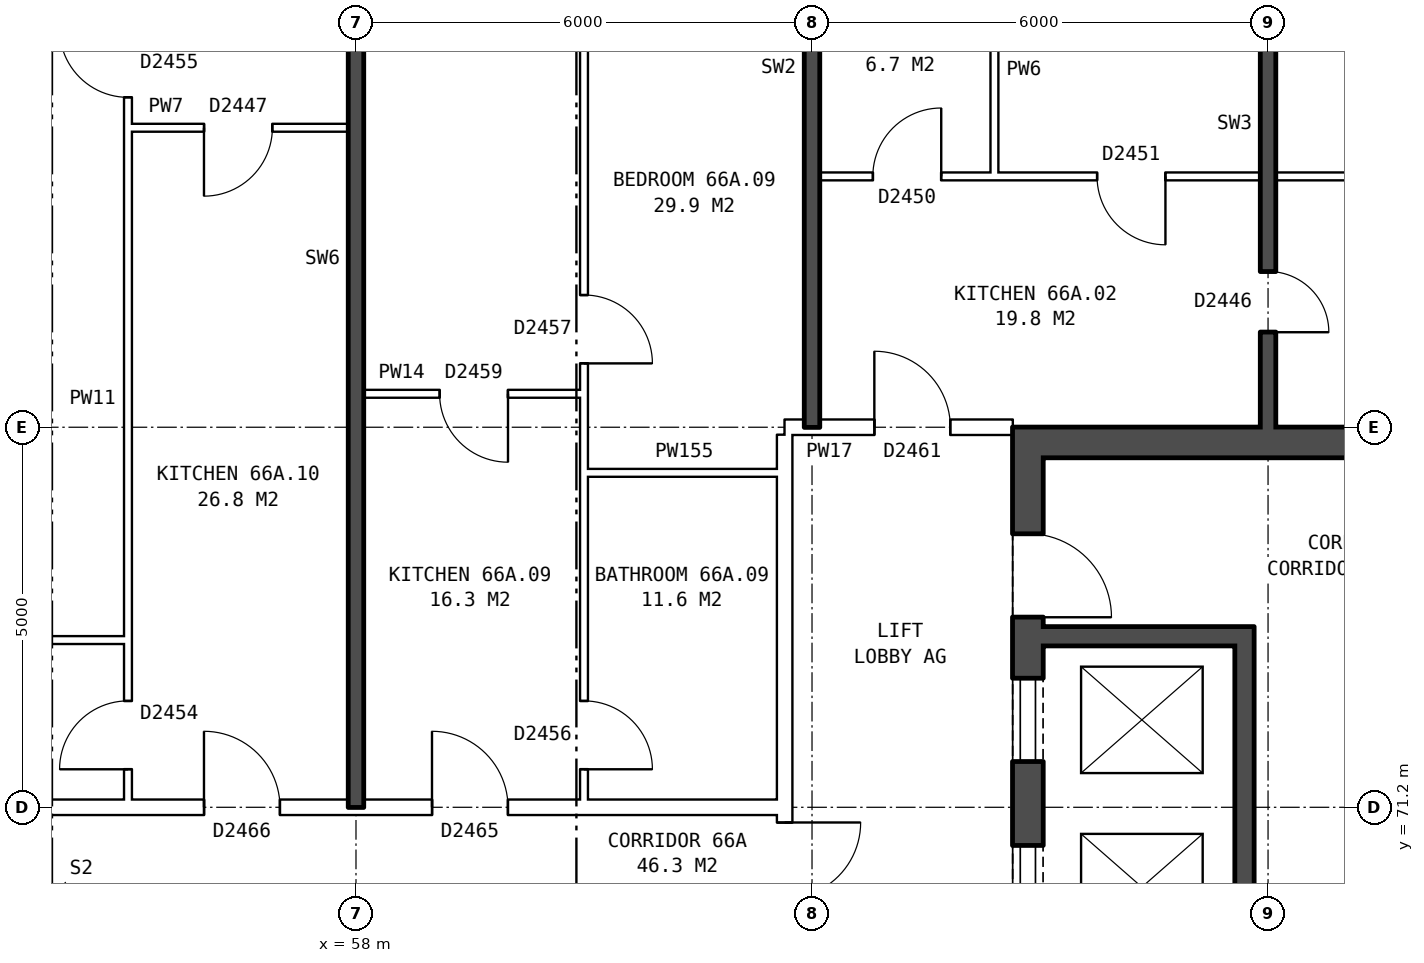
"""IFC4 building model, lengths in metres.
Left out: names, types, materials, properties, quantities, classifications, styles, units other than length and angle.
Written with IfcOpenShell. Run it as: python <this file> out.ifc"""

import sys

from ifc_helpers import new_model, si_unit, direction, frame, frame_2d, origin, place, context, subcontext, project, spatial, rectangle, extrude, element, fill, save


model = new_model("IFC4")
c1 = context("Model", 3, precision=1e-05, world=origin(), true_north=direction((0.0, 1.0)))
c2 = subcontext(c1, "Body", "Model", "MODEL_VIEW")
j1 = project(units=[si_unit("LENGTHUNIT", "METRE"), si_unit("PLANEANGLEUNIT", "RADIAN")], contexts=[c1])
p1 = place(None, origin())
s1 = spatial("IfcSite", under=j1, at=p1, CompositionType="ELEMENT")
p2 = place(p1, origin())
s2 = spatial("IfcBuilding", under=s1, at=p2, CompositionType="ELEMENT")
p3 = place(p2, frame((0.0, 0.0, 233.8)))
s3 = spatial("IfcBuildingStorey", under=s2, at=p3, CompositionType="ELEMENT", Elevation=233.8)
p4 = place(p3, frame((66.84, 63.8, 0.0), z_axis=(0.0, 0.0, 1.0), x_axis=(0.0, 1.0, 0.0)))
e1 = element("IfcWall", 1, at=p4, inside=s3, PredefinedType="SHEAR", context=c2, shape_type="SweptSolid", body=[
    extrude(rectangle(XDim=12.4, YDim=0.4, at=frame_2d((6.2, 0.0))), origin(), (0.0, 0.0, 1.0), 2.85),
])
p5 = place(p4, frame((1.325, 0.0, 0.0)))
e2 = element("IfcOpeningElement", 2, at=p5, cuts=e1, PredefinedType="OPENING", context=c2, shape_type="SweptSolid", body=[
    extrude(rectangle(XDim=1.1, YDim=2.1, at=frame_2d((0.55, 1.05))), frame((0.0, 0.21, 0.0), z_axis=(0.0, -1.0, 0.0), x_axis=(1.0, 0.0, 0.0)), (0.0, 0.0, 1.0), 0.42),
])
p6 = place(p4, frame((3.6, 0.0, 0.0)))
e3 = element("IfcOpeningElement", 3, at=p6, cuts=e1, PredefinedType="OPENING", context=c2, shape_type="SweptSolid", body=[
    extrude(rectangle(XDim=1.1, YDim=2.1, at=frame_2d((0.55, 1.05))), frame((0.0, 0.21, 0.0), z_axis=(0.0, -1.0, 0.0), x_axis=(1.0, 0.0, 0.0)), (0.0, 0.0, 1.0), 0.42),
])
p7 = place(p4, frame((5.8, 0.0, 0.0)))
e4 = element("IfcOpeningElement", 4, at=p7, cuts=e1, PredefinedType="OPENING", context=c2, shape_type="SweptSolid", body=[
    extrude(rectangle(XDim=1.1, YDim=2.1, at=frame_2d((0.55, 1.05))), frame((0.0, 0.21, 0.0), z_axis=(0.0, -1.0, 0.0), x_axis=(1.0, 0.0, 0.0)), (0.0, 0.0, 1.0), 0.42),
])
p8 = place(p4, frame((8.0, 0.0, 0.0)))
e5 = element("IfcOpeningElement", 5, at=p8, cuts=e1, PredefinedType="OPENING", context=c2, shape_type="SweptSolid", body=[
    extrude(rectangle(XDim=1.1, YDim=2.1, at=frame_2d((0.55, 1.05))), frame((0.0, 0.21, 0.0), z_axis=(0.0, -1.0, 0.0), x_axis=(1.0, 0.0, 0.0)), (0.0, 0.0, 1.0), 0.42),
])
p9 = place(p4, frame((9.9, 0.0, 0.0)))
e6 = element("IfcOpeningElement", 6, at=p9, cuts=e1, PredefinedType="OPENING", context=c2, shape_type="SweptSolid", body=[
    extrude(rectangle(XDim=1.1, YDim=2.1, at=frame_2d((0.55, 1.05))), frame((0.0, 0.21, 0.0), z_axis=(0.0, -1.0, 0.0), x_axis=(1.0, 0.0, 0.0)), (0.0, 0.0, 1.0), 0.42),
])
p10 = place(p3, frame((67.04, 76.0, 0.0), z_axis=(0.0, 0.0, 1.0), x_axis=(1.0, 0.0, 0.0)))
e7 = element("IfcWall", 7, at=p10, inside=s3, PredefinedType="SHEAR", context=c2, shape_type="SweptSolid", body=[
    extrude(rectangle(XDim=8.2, YDim=0.4, at=frame_2d((4.1, 0.0))), origin(), (0.0, 0.0, 1.0), 2.85),
])
p11 = place(p3, frame((67.04, 73.45, 0.0), z_axis=(0.0, 0.0, 1.0), x_axis=(1.0, 0.0, 0.0)))
e8 = element("IfcWall", 8, at=p11, inside=s3, PredefinedType="SHEAR", context=c2, shape_type="SweptSolid", body=[
    extrude(rectangle(XDim=2.525, YDim=0.25, at=frame_2d((1.262, 0.0))), origin(), (0.0, 0.0, 1.0), 2.85),
])
p12 = place(p3, frame((69.69, 66.975, 0.0), z_axis=(0.0, 0.0, 1.0), x_axis=(0.0, 1.0, 0.0)))
e9 = element("IfcWall", 9, at=p12, inside=s3, PredefinedType="SHEAR", context=c2, shape_type="SweptSolid", body=[
    extrude(rectangle(XDim=6.6, YDim=0.25, at=frame_2d((3.3, 0.0))), origin(), (0.0, 0.0, 1.0), 2.85),
])
p13 = place(p3, frame((63.64, 63.9, 0.0), z_axis=(0.0, 0.0, 1.0), x_axis=(0.0, 1.0, 0.0)))
e10 = element("IfcWall", 10, at=p13, inside=s3, PredefinedType="PARTITIONING", context=c2, shape_type="SweptSolid", body=[
    extrude(rectangle(XDim=12.2, YDim=0.2, at=frame_2d((6.1, 0.0))), origin(), (0.0, 0.0, 1.0), 2.85),
])
p14 = place(p13, frame((5.1, 0.0, 0.0)))
e11 = element("IfcOpeningElement", 11, at=p14, cuts=e10, PredefinedType="OPENING", context=c2, shape_type="SweptSolid", body=[
    extrude(rectangle(XDim=2.0, YDim=2.1, at=frame_2d((1.0, 1.05))), frame((0.0, 0.11, 0.0), z_axis=(0.0, -1.0, 0.0), x_axis=(1.0, 0.0, 0.0)), (0.0, 0.0, 1.0), 0.22),
])
p15 = place(p3, frame((44.36, 71.2, 0.0), z_axis=(0.0, 0.0, 1.0), x_axis=(1.0, 0.0, 0.0)))
e12 = element("IfcWall", 12, at=p15, inside=s3, PredefinedType="PARTITIONING", context=c2, shape_type="SweptSolid", body=[
    extrude(rectangle(XDim=19.28, YDim=0.2, at=frame_2d((9.64, 0.0))), origin(), (0.0, 0.0, 1.0), 2.85),
])
p16 = place(p15, frame((14.64, 0.0, 0.0)))
e13 = element("IfcOpeningElement", 13, at=p16, cuts=e12, PredefinedType="OPENING", context=c2, shape_type="SweptSolid", body=[
    extrude(rectangle(XDim=1.0, YDim=2.1, at=frame_2d((0.5, 1.05))), frame((0.0, 0.11, 0.0), z_axis=(0.0, -1.0, 0.0), x_axis=(1.0, 0.0, 0.0)), (0.0, 0.0, 1.0), 0.22),
])
p17 = place(p15, frame((11.64, 0.0, 0.0)))
e14 = element("IfcOpeningElement", 14, at=p17, cuts=e12, PredefinedType="OPENING", context=c2, shape_type="SweptSolid", body=[
    extrude(rectangle(XDim=1.0, YDim=2.1, at=frame_2d((0.5, 1.05))), frame((0.0, 0.11, 0.0), z_axis=(0.0, -1.0, 0.0), x_axis=(1.0, 0.0, 0.0)), (0.0, 0.0, 1.0), 0.22),
])
p18 = place(p15, frame((2.64, 0.0, 0.0)))
e15 = element("IfcOpeningElement", 15, at=p18, cuts=e12, PredefinedType="OPENING", context=c2, shape_type="SweptSolid", body=[
    extrude(rectangle(XDim=1.0, YDim=2.1, at=frame_2d((0.5, 1.05))), frame((0.0, 0.11, 0.0), z_axis=(0.0, -1.0, 0.0), x_axis=(1.0, 0.0, 0.0)), (0.0, 0.0, 1.0), 0.22),
])
p19 = place(p3, frame((52.1, 73.4, 0.0), z_axis=(0.0, 0.0, 1.0), x_axis=(1.0, 0.0, 0.0)))
e16 = element("IfcWall", 16, at=p19, inside=s3, PredefinedType="PARTITIONING", context=c2, shape_type="SweptSolid", body=[
    extrude(rectangle(XDim=2.9, YDim=0.1, at=frame_2d((1.45, 0.0))), origin(), (0.0, 0.0, 1.0), 2.85),
])
p20 = place(p3, frame((61.0, 75.6, 0.0), z_axis=(0.0, 0.0, 1.0), x_axis=(1.0, 0.0, 0.0)))
e17 = element("IfcWall", 17, at=p20, inside=s3, PredefinedType="PARTITIONING", context=c2, shape_type="SweptSolid", body=[
    extrude(rectangle(XDim=2.64, YDim=0.1, at=frame_2d((1.32, 0.0))), origin(), (0.0, 0.0, 1.0), 2.85),
])
p21 = place(p3, frame((63.64, 76.2, 0.0), z_axis=(0.0, 0.0, 1.0), x_axis=(1.0, 0.0, 0.0)))
e18 = element("IfcWall", 18, at=p21, inside=s3, PredefinedType="PARTITIONING", context=c2, shape_type="SweptSolid", body=[
    extrude(rectangle(XDim=3.0, YDim=0.2, at=frame_2d((1.5, 0.0))), origin(), (0.0, 0.0, 1.0), 2.85),
])
p22 = place(p21, frame((1.18, 0.0, 0.0)))
e19 = element("IfcOpeningElement", 19, at=p22, cuts=e18, PredefinedType="OPENING", context=c2, shape_type="SweptSolid", body=[
    extrude(rectangle(XDim=1.0, YDim=2.1, at=frame_2d((0.5, 1.05))), frame((0.0, 0.11, 0.0), z_axis=(0.0, -1.0, 0.0), x_axis=(1.0, 0.0, 0.0)), (0.0, 0.0, 1.0), 0.22),
])
p23 = place(p3, frame((58.1, 76.64, 0.0), z_axis=(0.0, 0.0, 1.0), x_axis=(1.0, 0.0, 0.0)))
e20 = element("IfcWall", 20, at=p23, inside=s3, PredefinedType="PARTITIONING", context=c2, shape_type="SweptSolid", body=[
    extrude(rectangle(XDim=2.9, YDim=0.1, at=frame_2d((1.45, 0.0))), origin(), (0.0, 0.0, 1.0), 2.85),
])
p24 = place(p23, frame((1.0, 0.0, 0.0)))
e21 = element("IfcOpeningElement", 21, at=p24, cuts=e20, PredefinedType="OPENING", context=c2, shape_type="SweptSolid", body=[
    extrude(rectangle(XDim=0.9, YDim=2.1, at=frame_2d((0.45, 1.05))), frame((0.0, 0.06, 0.0), z_axis=(0.0, -1.0, 0.0), x_axis=(1.0, 0.0, 0.0)), (0.0, 0.0, 1.0), 0.12),
])
p25 = place(p3, frame((64.1, 79.5, 0.0), z_axis=(0.0, 0.0, 1.0), x_axis=(1.0, 0.0, 0.0)))
e22 = element("IfcWall", 22, at=p25, inside=s3, PredefinedType="PARTITIONING", context=c2, shape_type="SweptSolid", body=[
    extrude(rectangle(XDim=11.8, YDim=0.1, at=frame_2d((5.9, 0.0))), origin(), (0.0, 0.0, 1.0), 2.85),
])
p26 = place(p25, frame((3.65, 0.0, 0.0)))
e23 = element("IfcOpeningElement", 23, at=p26, cuts=e22, PredefinedType="OPENING", context=c2, shape_type="SweptSolid", body=[
    extrude(rectangle(XDim=0.9, YDim=2.1, at=frame_2d((0.45, 1.05))), frame((0.0, 0.06, 0.0), z_axis=(0.0, -1.0, 0.0), x_axis=(1.0, 0.0, 0.0)), (0.0, 0.0, 1.0), 0.12),
])
p27 = place(p25, frame((0.7, 0.0, 0.0)))
e24 = element("IfcOpeningElement", 24, at=p27, cuts=e22, PredefinedType="OPENING", context=c2, shape_type="SweptSolid", body=[
    extrude(rectangle(XDim=0.9, YDim=2.1, at=frame_2d((0.45, 1.05))), frame((0.0, 0.06, 0.0), z_axis=(0.0, -1.0, 0.0), x_axis=(1.0, 0.0, 0.0)), (0.0, 0.0, 1.0), 0.12),
])
p28 = place(p3, frame((55.0, 80.14, 0.0), z_axis=(0.0, 0.0, 1.0), x_axis=(1.0, 0.0, 0.0)))
e25 = element("IfcWall", 25, at=p28, inside=s3, PredefinedType="PARTITIONING", context=c2, shape_type="SweptSolid", body=[
    extrude(rectangle(XDim=2.9, YDim=0.1, at=frame_2d((1.45, 0.0))), origin(), (0.0, 0.0, 1.0), 2.85),
])
p29 = place(p28, frame((1.0, 0.0, 0.0)))
e26 = element("IfcOpeningElement", 26, at=p29, cuts=e25, PredefinedType="OPENING", context=c2, shape_type="SweptSolid", body=[
    extrude(rectangle(XDim=0.9, YDim=2.1, at=frame_2d((0.45, 1.05))), frame((0.0, 0.06, 0.0), z_axis=(0.0, -1.0, 0.0), x_axis=(1.0, 0.0, 0.0)), (0.0, 0.0, 1.0), 0.12),
])
p30 = place(p3, frame((55.0, 71.3, 0.0), z_axis=(0.0, 0.0, 1.0), x_axis=(0.0, 1.0, 0.0)))
e27 = element("IfcWall", 27, at=p30, inside=s3, PredefinedType="PARTITIONING", context=c2, shape_type="SweptSolid", body=[
    extrude(rectangle(XDim=14.34, YDim=0.1, at=frame_2d((7.17, 0.0))), origin(), (0.0, 0.0, 1.0), 2.85),
])
p31 = place(p30, frame((9.24, 0.0, 0.0)))
e28 = element("IfcOpeningElement", 28, at=p31, cuts=e27, PredefinedType="OPENING", context=c2, shape_type="SweptSolid", body=[
    extrude(rectangle(XDim=0.9, YDim=2.1, at=frame_2d((0.45, 1.05))), frame((0.0, 0.06, 0.0), z_axis=(0.0, -1.0, 0.0), x_axis=(1.0, 0.0, 0.0)), (0.0, 0.0, 1.0), 0.12),
])
p32 = place(p30, frame((0.4, 0.0, 0.0)))
e29 = element("IfcOpeningElement", 29, at=p32, cuts=e27, PredefinedType="OPENING", context=c2, shape_type="SweptSolid", body=[
    extrude(rectangle(XDim=0.9, YDim=2.1, at=frame_2d((0.45, 1.05))), frame((0.0, 0.06, 0.0), z_axis=(0.0, -1.0, 0.0), x_axis=(1.0, 0.0, 0.0)), (0.0, 0.0, 1.0), 0.12),
])
p33 = place(p3, frame((58.0, 71.2, 0.0), z_axis=(0.0, 0.0, 1.0), x_axis=(0.0, 1.0, 0.0)))
e30 = element("IfcWall", 30, at=p33, inside=s3, PredefinedType="SOLIDWALL", context=c2, shape_type="SweptSolid", body=[
    extrude(rectangle(XDim=14.44, YDim=0.2, at=frame_2d((7.22, 0.0))), origin(), (0.0, 0.0, 1.0), 2.85),
])
p34 = place(p3, frame((61.0, 71.3, 0.0), z_axis=(0.0, 0.0, 1.0), x_axis=(0.0, 1.0, 0.0)))
e31 = element("IfcWall", 31, at=p34, inside=s3, PredefinedType="PARTITIONING", context=c2, shape_type="SweptSolid", body=[
    extrude(rectangle(XDim=14.34, YDim=0.1, at=frame_2d((7.17, 0.0))), origin(), (0.0, 0.0, 1.0), 2.85),
])
p35 = place(p34, frame((5.74, 0.0, 0.0)))
e32 = element("IfcOpeningElement", 32, at=p35, cuts=e31, PredefinedType="OPENING", context=c2, shape_type="SweptSolid", body=[
    extrude(rectangle(XDim=0.9, YDim=2.1, at=frame_2d((0.45, 1.05))), frame((0.0, 0.06, 0.0), z_axis=(0.0, -1.0, 0.0), x_axis=(1.0, 0.0, 0.0)), (0.0, 0.0, 1.0), 0.12),
])
p36 = place(p34, frame((0.4, 0.0, 0.0)))
e33 = element("IfcOpeningElement", 33, at=p36, cuts=e31, PredefinedType="OPENING", context=c2, shape_type="SweptSolid", body=[
    extrude(rectangle(XDim=0.9, YDim=2.1, at=frame_2d((0.45, 1.05))), frame((0.0, 0.06, 0.0), z_axis=(0.0, -1.0, 0.0), x_axis=(1.0, 0.0, 0.0)), (0.0, 0.0, 1.0), 0.12),
])
p37 = place(p3, frame((64.0, 76.2, 0.0), z_axis=(0.0, 0.0, 1.0), x_axis=(0.0, 1.0, 0.0)))
e34 = element("IfcWall", 34, at=p37, inside=s3, PredefinedType="SOLIDWALL", context=c2, shape_type="SweptSolid", body=[
    extrude(rectangle(XDim=9.44, YDim=0.2, at=frame_2d((4.72, 0.0))), origin(), (0.0, 0.0, 1.0), 2.85),
])
p38 = place(p3, frame((66.4, 79.55, 0.0), z_axis=(0.0, 0.0, 1.0), x_axis=(0.0, 1.0, 0.0)))
e35 = element("IfcWall", 35, at=p38, inside=s3, PredefinedType="PARTITIONING", context=c2, shape_type="SweptSolid", body=[
    extrude(rectangle(XDim=2.7, YDim=0.1, at=frame_2d((1.35, 0.0))), origin(), (0.0, 0.0, 1.0), 2.85),
])
p39 = place(p3, frame((70.0, 76.2, 0.0), z_axis=(0.0, 0.0, 1.0), x_axis=(0.0, 1.0, 0.0)))
e36 = element("IfcWall", 36, at=p39, inside=s3, PredefinedType="SOLIDWALL", context=c2, shape_type="SweptSolid", body=[
    extrude(rectangle(XDim=9.44, YDim=0.2, at=frame_2d((4.72, 0.0))), origin(), (0.0, 0.0, 1.0), 2.85),
])
p40 = place(p39, frame((5.92, 0.0, 0.0)))
e37 = element("IfcOpeningElement", 37, at=p40, cuts=e36, PredefinedType="OPENING", context=c2, shape_type="SweptSolid", body=[
    extrude(rectangle(XDim=0.9, YDim=2.1, at=frame_2d((0.45, 1.05))), frame((0.0, 0.11, 0.0), z_axis=(0.0, -1.0, 0.0), x_axis=(1.0, 0.0, 0.0)), (0.0, 0.0, 1.0), 0.22),
])
p41 = place(p39, frame((1.25, 0.0, 0.0)))
e38 = element("IfcOpeningElement", 38, at=p41, cuts=e36, PredefinedType="OPENING", context=c2, shape_type="SweptSolid", body=[
    extrude(rectangle(XDim=0.8, YDim=2.1, at=frame_2d((0.4, 1.05))), frame((0.0, 0.11, 0.0), z_axis=(0.0, -1.0, 0.0), x_axis=(1.0, 0.0, 0.0)), (0.0, 0.0, 1.0), 0.22),
])
p42 = place(p7, origin())
e39 = element("IfcDoor", 39, at=p42, inside=s3, OperationType="DOUBLE_DOOR_SLIDING", PredefinedType="DOOR", context=c2, shape_type="SweptSolid", body=[
    extrude(rectangle(XDim=1.1, YDim=2.1, at=frame_2d((0.55, 1.05))), frame((0.0, -0.135, 0.0), z_axis=(0.0, -1.0, 0.0), x_axis=(1.0, 0.0, 0.0)), (0.0, 0.0, 1.0), 0.05),
])
fill(e4, e39)
p43 = place(p8, origin())
e40 = element("IfcDoor", 40, at=p43, inside=s3, OperationType="DOUBLE_DOOR_SLIDING", PredefinedType="DOOR", context=c2, shape_type="SweptSolid", body=[
    extrude(rectangle(XDim=1.1, YDim=2.1, at=frame_2d((0.55, 1.05))), frame((0.0, -0.135, 0.0), z_axis=(0.0, -1.0, 0.0), x_axis=(1.0, 0.0, 0.0)), (0.0, 0.0, 1.0), 0.05),
])
fill(e5, e40)
p44 = place(p9, frame((1.1, 0.0, 0.0), z_axis=(0.0, 0.0, 1.0), x_axis=(-1.0, 0.0, 0.0)))
e41 = element("IfcDoor", 41, at=p44, inside=s3, OperationType="SINGLE_SWING_RIGHT", PredefinedType="DOOR", context=c2, shape_type="SweptSolid", body=[
    extrude(rectangle(XDim=1.1, YDim=2.1, at=frame_2d((0.55, 1.05))), frame((0.0, 0.185, 0.0), z_axis=(0.0, -1.0, 0.0), x_axis=(1.0, 0.0, 0.0)), (0.0, 0.0, 1.0), 0.05),
])
fill(e6, e41)
p45 = place(p14, frame((2.0, 0.0, 0.0), z_axis=(0.0, 0.0, 1.0), x_axis=(-1.0, 0.0, 0.0)))
e42 = element("IfcDoor", 42, at=p45, inside=s3, OperationType="DOUBLE_DOOR_SINGLE_SWING", PredefinedType="DOOR", context=c2, shape_type="SweptSolid", body=[
    extrude(rectangle(XDim=2.0, YDim=2.1, at=frame_2d((1.0, 1.05))), frame((0.0, 0.025, 0.0), z_axis=(0.0, -1.0, 0.0), x_axis=(1.0, 0.0, 0.0)), (0.0, 0.0, 1.0), 0.05),
])
fill(e11, e42)
p46 = place(p22, origin())
e43 = element("IfcDoor", 43, at=p46, inside=s3, OperationType="SINGLE_SWING_LEFT", PredefinedType="DOOR", context=c2, shape_type="SweptSolid", body=[
    extrude(rectangle(XDim=1.0, YDim=2.1, at=frame_2d((0.5, 1.05))), frame((0.0, 0.025, 0.0), z_axis=(0.0, -1.0, 0.0), x_axis=(1.0, 0.0, 0.0)), (0.0, 0.0, 1.0), 0.05),
])
fill(e19, e43)
p47 = place(p26, frame((0.9, 0.0, 0.0), z_axis=(0.0, 0.0, 1.0), x_axis=(-1.0, 0.0, 0.0)))
e44 = element("IfcDoor", 44, at=p47, inside=s3, OperationType="SINGLE_SWING_LEFT", PredefinedType="DOOR", context=c2, shape_type="SweptSolid", body=[
    extrude(rectangle(XDim=0.9, YDim=2.1, at=frame_2d((0.45, 1.05))), frame((0.0, 0.025, 0.0), z_axis=(0.0, -1.0, 0.0), x_axis=(1.0, 0.0, 0.0)), (0.0, 0.0, 1.0), 0.05),
])
fill(e23, e44)
p48 = place(p41, frame((0.8, 0.0, 0.0), z_axis=(0.0, 0.0, 1.0), x_axis=(-1.0, 0.0, 0.0)))
e45 = element("IfcDoor", 45, at=p48, inside=s3, OperationType="SINGLE_SWING_RIGHT", PredefinedType="DOOR", context=c2, shape_type="SweptSolid", body=[
    extrude(rectangle(XDim=0.8, YDim=2.1, at=frame_2d((0.4, 1.05))), frame((0.0, 0.025, 0.0), z_axis=(0.0, -1.0, 0.0), x_axis=(1.0, 0.0, 0.0)), (0.0, 0.0, 1.0), 0.05),
])
fill(e38, e45)
p49 = place(p27, origin())
e46 = element("IfcDoor", 46, at=p49, inside=s3, OperationType="SINGLE_SWING_RIGHT", PredefinedType="DOOR", context=c2, shape_type="SweptSolid", body=[
    extrude(rectangle(XDim=0.9, YDim=2.1, at=frame_2d((0.45, 1.05))), frame((0.0, 0.025, 0.0), z_axis=(0.0, -1.0, 0.0), x_axis=(1.0, 0.0, 0.0)), (0.0, 0.0, 1.0), 0.05),
])
fill(e24, e46)
p50 = place(p35, frame((0.9, 0.0, 0.0), z_axis=(0.0, 0.0, 1.0), x_axis=(-1.0, 0.0, 0.0)))
e47 = element("IfcDoor", 47, at=p50, inside=s3, OperationType="SINGLE_SWING_RIGHT", PredefinedType="DOOR", context=c2, shape_type="SweptSolid", body=[
    extrude(rectangle(XDim=0.9, YDim=2.1, at=frame_2d((0.45, 1.05))), frame((0.0, 0.025, 0.0), z_axis=(0.0, -1.0, 0.0), x_axis=(1.0, 0.0, 0.0)), (0.0, 0.0, 1.0), 0.05),
])
fill(e32, e47)
p51 = place(p16, origin())
e48 = element("IfcDoor", 48, at=p51, inside=s3, OperationType="SINGLE_SWING_LEFT", PredefinedType="DOOR", context=c2, shape_type="SweptSolid", body=[
    extrude(rectangle(XDim=1.0, YDim=2.1, at=frame_2d((0.5, 1.05))), frame((0.0, 0.025, 0.0), z_axis=(0.0, -1.0, 0.0), x_axis=(1.0, 0.0, 0.0)), (0.0, 0.0, 1.0), 0.05),
])
fill(e13, e48)
p52 = place(p24, frame((0.9, 0.0, 0.0), z_axis=(0.0, 0.0, 1.0), x_axis=(-1.0, 0.0, 0.0)))
e49 = element("IfcDoor", 49, at=p52, inside=s3, OperationType="SINGLE_SWING_LEFT", PredefinedType="DOOR", context=c2, shape_type="SweptSolid", body=[
    extrude(rectangle(XDim=0.9, YDim=2.1, at=frame_2d((0.45, 1.05))), frame((0.0, 0.025, 0.0), z_axis=(0.0, -1.0, 0.0), x_axis=(1.0, 0.0, 0.0)), (0.0, 0.0, 1.0), 0.05),
])
fill(e21, e49)
p53 = place(p36, frame((0.9, 0.0, 0.0), z_axis=(0.0, 0.0, 1.0), x_axis=(-1.0, 0.0, 0.0)))
e50 = element("IfcDoor", 50, at=p53, inside=s3, OperationType="SINGLE_SWING_RIGHT", PredefinedType="DOOR", context=c2, shape_type="SweptSolid", body=[
    extrude(rectangle(XDim=0.9, YDim=2.1, at=frame_2d((0.45, 1.05))), frame((0.0, 0.025, 0.0), z_axis=(0.0, -1.0, 0.0), x_axis=(1.0, 0.0, 0.0)), (0.0, 0.0, 1.0), 0.05),
])
fill(e33, e50)
p54 = place(p31, origin())
e51 = element("IfcDoor", 51, at=p54, inside=s3, OperationType="SINGLE_SWING_RIGHT", PredefinedType="DOOR", context=c2, shape_type="SweptSolid", body=[
    extrude(rectangle(XDim=0.9, YDim=2.1, at=frame_2d((0.45, 1.05))), frame((0.0, 0.025, 0.0), z_axis=(0.0, -1.0, 0.0), x_axis=(1.0, 0.0, 0.0)), (0.0, 0.0, 1.0), 0.05),
])
fill(e28, e51)
p55 = place(p17, origin())
e52 = element("IfcDoor", 52, at=p55, inside=s3, OperationType="SINGLE_SWING_LEFT", PredefinedType="DOOR", context=c2, shape_type="SweptSolid", body=[
    extrude(rectangle(XDim=1.0, YDim=2.1, at=frame_2d((0.5, 1.05))), frame((0.0, 0.025, 0.0), z_axis=(0.0, -1.0, 0.0), x_axis=(1.0, 0.0, 0.0)), (0.0, 0.0, 1.0), 0.05),
])
fill(e14, e52)
p56 = place(p29, frame((0.9, 0.0, 0.0), z_axis=(0.0, 0.0, 1.0), x_axis=(-1.0, 0.0, 0.0)))
e53 = element("IfcDoor", 53, at=p56, inside=s3, OperationType="SINGLE_SWING_RIGHT", PredefinedType="DOOR", context=c2, shape_type="SweptSolid", body=[
    extrude(rectangle(XDim=0.9, YDim=2.1, at=frame_2d((0.45, 1.05))), frame((0.0, 0.025, 0.0), z_axis=(0.0, -1.0, 0.0), x_axis=(1.0, 0.0, 0.0)), (0.0, 0.0, 1.0), 0.05),
])
fill(e26, e53)
p57 = place(p32, origin())
e54 = element("IfcDoor", 54, at=p57, inside=s3, OperationType="SINGLE_SWING_LEFT", PredefinedType="DOOR", context=c2, shape_type="SweptSolid", body=[
    extrude(rectangle(XDim=0.9, YDim=2.1, at=frame_2d((0.45, 1.05))), frame((0.0, 0.025, 0.0), z_axis=(0.0, -1.0, 0.0), x_axis=(1.0, 0.0, 0.0)), (0.0, 0.0, 1.0), 0.05),
])
fill(e29, e54)
save(model, sys.argv[1])
